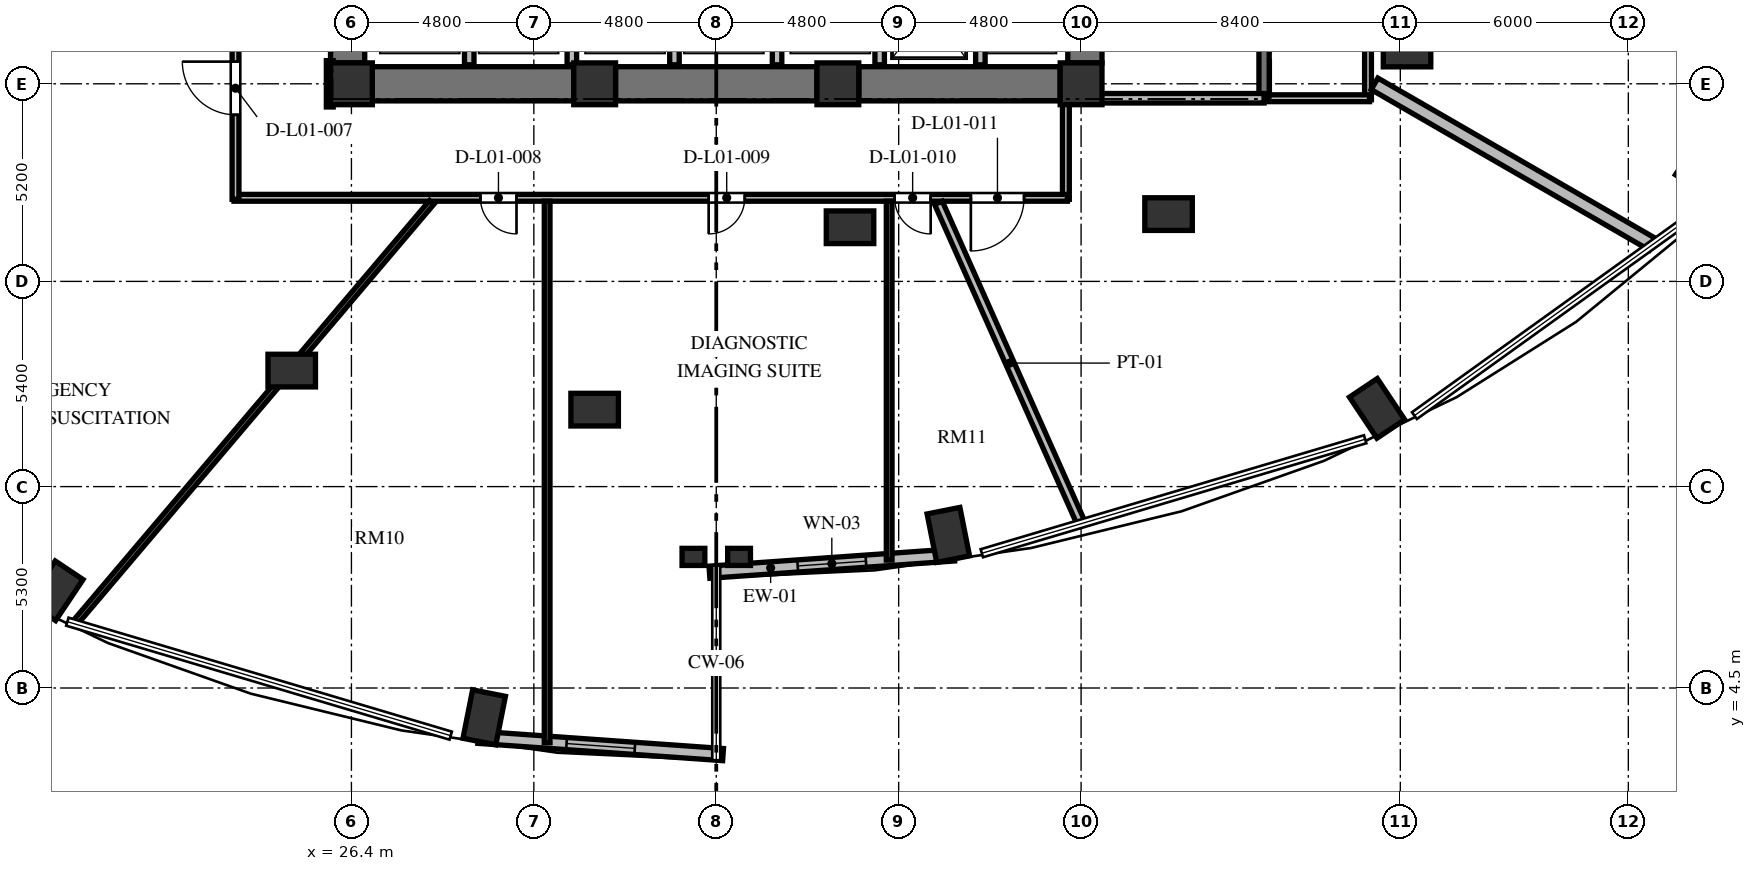
"""IFC4 building model, lengths in metres.
Left out: names, types, materials, properties, quantities, classifications, styles, units other than length and angle.
Written with IfcOpenShell. Run it as: python <this file> out.ifc"""

import sys

from ifc_helpers import new_model, si_unit, direction, frame, frame_2d, origin, origin_2d, place, context, subcontext, project, spatial, rectangle, extrude, element, fill, save


model = new_model("IFC4")
c1 = context("Model", 3, precision=1e-05, world=origin(), true_north=direction((0.0, 1.0)))
c2 = subcontext(c1, "Body", "Model", "MODEL_VIEW")
j1 = project(units=[si_unit("LENGTHUNIT", "METRE"), si_unit("PLANEANGLEUNIT", "RADIAN")], contexts=[c1])
p1 = place(None, origin())
s1 = spatial("IfcSite", under=j1, at=p1, CompositionType="ELEMENT")
p2 = place(p1, origin())
s2 = spatial("IfcBuilding", under=s1, at=p2, CompositionType="ELEMENT")
p3 = place(p2, frame((0.0, 0.0, 6.0)))
s3 = spatial("IfcBuildingStorey", under=s2, at=p3, CompositionType="ELEMENT", Elevation=6.0)
for number, where, z_axis, x_axis in (
    (1, (42.106, 8.529, 0.0), (0.0, 0.0, 1.0), (0.195, -0.981, 0.0)),
    (2, (53.389, 11.858, 0.0), (0.0, 0.0, 1.0), (0.556, -0.831, 0.0)),
    (3, (62.025, 18.011, 0.0), (0.0, 0.0, 1.0), (0.831, -0.556, 0.0)),
    (4, (18.611, 7.058, 0.0), (0.0, 0.0, 1.0), (-0.556, -0.831, 0.0)),
    (5, (29.894, 3.729, 0.0), (0.0, 0.0, 1.0), (-0.195, -0.981, 0.0)),
):
    element("IfcColumn", number, at=place(p3, frame(where, z_axis=z_axis, x_axis=x_axis)), inside=s3, PredefinedType="COLUMN", context=c2, shape_type="SweptSolid", body=[
        extrude(rectangle(XDim=1.3, YDim=0.88, at=origin_2d()), origin(), (0.0, 0.0, 1.0), 4.8),
    ])
for number, where, z_axis, x_axis in (
    (6, (26.4, 20.4, 0.0), (0.0, 0.0, 1.0), (1.0, 0.0, 0.0)),
    (7, (32.8, 20.4, 0.0), (0.0, 0.0, 1.0), (1.0, 0.0, 0.0)),
    (8, (39.2, 20.4, 0.0), (0.0, 0.0, 1.0), (1.0, 0.0, 0.0)),
    (9, (45.6, 20.4, 0.0), (0.0, 0.0, 1.0), (1.0, 0.0, 0.0)),
):
    element("IfcColumn", number, at=place(p3, frame(where, z_axis=z_axis, x_axis=x_axis)), inside=s3, PredefinedType="COLUMN", context=c2, shape_type="SweptSolid", body=[
        extrude(rectangle(XDim=1.1, YDim=1.1, at=origin_2d()), origin(), (0.0, 0.0, 1.0), 4.8),
    ])
for number, where, z_axis, x_axis in (
    (10, (39.52, 16.625, 0.0), (0.0, 0.0, 1.0), (1.0, 0.0, 0.0)),
    (11, (47.902, 16.971, 0.0), (0.0, 0.0, 1.0), (1.0, 0.0, 0.0)),
    (12, (54.177, 21.276, 0.0), (0.0, 0.0, 1.0), (1.0, 0.0, 0.0)),
    (13, (24.829, 12.853, 0.0), (0.0, 0.0, 1.0), (1.0, 0.0, 0.0)),
    (14, (32.8, 11.825, 0.0), (0.0, 0.0, 1.0), (1.0, 0.0, 0.0)),
):
    element("IfcColumn", number, at=place(p3, frame(where, z_axis=z_axis, x_axis=x_axis)), inside=s3, PredefinedType="COLUMN", context=c2, shape_type="SweptSolid", body=[
        extrude(rectangle(XDim=1.25, YDim=0.86, at=origin_2d()), origin(), (0.0, 0.0, 1.0), 4.8),
    ])
for number, where, z_axis, x_axis in (
    (15, (35.4, 7.95, 0.0), (0.0, 0.0, 1.0), (1.0, 0.0, 0.0)),
    (16, (36.6, 7.95, 0.0), (0.0, 0.0, 1.0), (1.0, 0.0, 0.0)),
):
    element("IfcColumn", number, at=place(p3, frame(where, z_axis=z_axis, x_axis=x_axis)), inside=s3, PredefinedType="PILASTER", context=c2, shape_type="SweptSolid", body=[
        extrude(rectangle(XDim=0.6, YDim=0.45, at=origin_2d()), origin(), (0.0, 0.0, 1.0), 4.8),
    ])
p4 = place(p3, frame((26.3, 20.95, 0.0), z_axis=(0.0, 0.0, 1.0), x_axis=(0.0, 1.0, 0.0)))
e17 = element("IfcWall", 17, at=p4, inside=s3, PredefinedType="SHEAR", context=c2, shape_type="SweptSolid", body=[
    extrude(rectangle(XDim=14.1, YDim=0.9, at=frame_2d((7.05, 0.0))), origin(), (0.0, 0.0, 1.0), 4.8),
])
p5 = place(p4, frame((6.5, 0.0, 0.0)))
e18 = element("IfcOpeningElement", 18, at=p5, cuts=e17, PredefinedType="OPENING", context=c2, shape_type="SweptSolid", body=[
    extrude(rectangle(XDim=1.2, YDim=2.15, at=frame_2d((0.6, 1.075))), frame((0.0, 0.46, 0.0), z_axis=(0.0, -1.0, 0.0), x_axis=(1.0, 0.0, 0.0)), (0.0, 0.0, 1.0), 0.92),
])
p6 = place(p4, frame((9.6, 0.0, 0.0)))
e19 = element("IfcOpeningElement", 19, at=p6, cuts=e17, PredefinedType="OPENING", context=c2, shape_type="SweptSolid", body=[
    extrude(rectangle(XDim=1.3, YDim=2.2, at=frame_2d((0.65, 1.1))), frame((0.0, 0.46, 0.0), z_axis=(0.0, -1.0, 0.0), x_axis=(1.0, 0.0, 0.0)), (0.0, 0.0, 1.0), 0.92),
])
p7 = place(p4, frame((3.26, 0.0, 0.0)))
e20 = element("IfcOpeningElement", 20, at=p7, cuts=e17, PredefinedType="OPENING", context=c2, shape_type="SweptSolid", body=[
    extrude(rectangle(XDim=1.3, YDim=2.2, at=frame_2d((0.65, 1.1))), frame((0.0, 0.46, 0.0), z_axis=(0.0, -1.0, 0.0), x_axis=(1.0, 0.0, 0.0)), (0.0, 0.0, 1.0), 0.92),
])
p8 = place(p3, frame((45.7, 20.95, 0.0), z_axis=(0.0, 0.0, 1.0), x_axis=(0.0, 1.0, 0.0)))
e21 = element("IfcWall", 21, at=p8, inside=s3, PredefinedType="SHEAR", context=c2, shape_type="SweptSolid", body=[
    extrude(rectangle(XDim=14.1, YDim=0.9, at=frame_2d((7.05, 0.0))), origin(), (0.0, 0.0, 1.0), 4.8),
])
p9 = place(p8, frame((11.75, 0.0, 0.0)))
e22 = element("IfcOpeningElement", 22, at=p9, cuts=e21, PredefinedType="OPENING", context=c2, shape_type="SweptSolid", body=[
    extrude(rectangle(XDim=1.4, YDim=2.3, at=frame_2d((0.7, 1.15))), frame((0.0, 0.46, 0.0), z_axis=(0.0, -1.0, 0.0), x_axis=(1.0, 0.0, 0.0)), (0.0, 0.0, 1.0), 0.92),
])
p10 = place(p8, frame((0.95, 0.0, 0.0)))
e23 = element("IfcOpeningElement", 23, at=p10, cuts=e21, PredefinedType="OPENING", context=c2, shape_type="SweptSolid", body=[
    extrude(rectangle(XDim=1.4, YDim=2.3, at=frame_2d((0.7, 1.15))), frame((0.0, 0.46, 0.0), z_axis=(0.0, -1.0, 0.0), x_axis=(1.0, 0.0, 0.0)), (0.0, 0.0, 1.0), 0.92),
])
p11 = place(p3, frame((26.95, 20.4, 0.0), z_axis=(0.0, 0.0, 1.0), x_axis=(1.0, 0.0, 0.0)))
e24 = element("IfcWall", 24, at=p11, inside=s3, PredefinedType="SHEAR", context=c2, shape_type="SweptSolid", body=[
    extrude(rectangle(XDim=5.3, YDim=0.9, at=frame_2d((2.65, 0.0))), origin(), (0.0, 0.0, 1.0), 4.8),
])
p12 = place(p3, frame((33.35, 20.4, 0.0), z_axis=(0.0, 0.0, 1.0), x_axis=(1.0, 0.0, 0.0)))
e25 = element("IfcWall", 25, at=p12, inside=s3, PredefinedType="SHEAR", context=c2, shape_type="SweptSolid", body=[
    extrude(rectangle(XDim=5.3, YDim=0.9, at=frame_2d((2.65, 0.0))), origin(), (0.0, 0.0, 1.0), 4.8),
])
p13 = place(p3, frame((39.75, 20.4, 0.0), z_axis=(0.0, 0.0, 1.0), x_axis=(1.0, 0.0, 0.0)))
e26 = element("IfcWall", 26, at=p13, inside=s3, PredefinedType="SHEAR", context=c2, shape_type="SweptSolid", body=[
    extrude(rectangle(XDim=5.3, YDim=0.9, at=frame_2d((2.65, 0.0))), origin(), (0.0, 0.0, 1.0), 4.8),
])
p14 = place(p3, frame((35.82, 7.547, 0.0), z_axis=(0.0, 0.0, 1.0), x_axis=(0.99751367159, 0.070473221795, 0.0)))
e27 = element("IfcWall", 27, at=p14, inside=s3, PredefinedType="SOLIDWALL", context=c2, shape_type="SweptSolid", body=[
    extrude(rectangle(XDim=6.458, YDim=0.32, at=frame_2d((3.229, 0.0))), origin(), (0.0, 0.0, 1.0), 4.52),
])
p15 = place(p14, frame((2.329, 0.0, 0.85)))
e28 = element("IfcOpeningElement", 28, at=p15, cuts=e27, PredefinedType="OPENING", context=c2, shape_type="SweptSolid", body=[
    extrude(rectangle(XDim=1.8, YDim=2.4, at=frame_2d((0.9, 1.2))), frame((0.0, 0.17, 0.0), z_axis=(0.0, -1.0, 0.0), x_axis=(1.0, 0.0, 0.0)), (0.0, 0.0, 1.0), 0.34),
])
p16 = place(p3, frame((29.738, 3.202, 0.0), z_axis=(0.0, 0.0, 1.0), x_axis=(0.997513108184, -0.070481196075, 0.0)))
e29 = element("IfcWall", 29, at=p16, inside=s3, PredefinedType="SOLIDWALL", context=c2, shape_type="SweptSolid", body=[
    extrude(rectangle(XDim=6.457, YDim=0.32, at=frame_2d((3.229, 0.0))), origin(), (0.0, 0.0, 1.0), 4.52),
])
p17 = place(p16, frame((2.328, 0.0, 0.85)))
e30 = element("IfcOpeningElement", 30, at=p17, cuts=e29, PredefinedType="OPENING", context=c2, shape_type="SweptSolid", body=[
    extrude(rectangle(XDim=1.8, YDim=2.4, at=frame_2d((0.9, 1.2))), frame((0.0, 0.17, 0.0), z_axis=(0.0, -1.0, 0.0), x_axis=(1.0, 0.0, 0.0)), (0.0, 0.0, 1.0), 0.34),
])
p18 = place(p3, frame((42.95, 20.9, 0.0), z_axis=(0.0, 0.0, 1.0), x_axis=(0.0, 1.0, 0.0)))
e31 = element("IfcWall", 31, at=p18, inside=s3, PredefinedType="SOLIDWALL", context=c2, shape_type="SweptSolid", body=[
    extrude(rectangle(XDim=3.2, YDim=0.25, at=frame_2d((1.6, 0.0))), origin(), (0.0, 0.0, 1.0), 4.52),
])
for number, where, z_axis, x_axis in (
    (32, (29.5, 20.9, 0.0), (0.0, 0.0, 1.0), (0.0, 1.0, 0.0)),
    (33, (32.2, 20.9, 0.0), (0.0, 0.0, 1.0), (0.0, 1.0, 0.0)),
    (34, (34.9, 20.9, 0.0), (0.0, 0.0, 1.0), (0.0, 1.0, 0.0)),
    (35, (37.6, 20.9, 0.0), (0.0, 0.0, 1.0), (0.0, 1.0, 0.0)),
    (36, (40.3, 20.9, 0.0), (0.0, 0.0, 1.0), (0.0, 1.0, 0.0)),
):
    element("IfcWall", number, at=place(p3, frame(where, z_axis=z_axis, x_axis=x_axis)), inside=s3, PredefinedType="SOLIDWALL", context=c2, shape_type="SweptSolid", body=[
        extrude(rectangle(XDim=2.8, YDim=0.25, at=frame_2d((1.4, 0.0))), origin(), (0.0, 0.0, 1.0), 4.52),
    ])
p19 = place(p3, frame((50.415, 35.845, 0.0), z_axis=(0.0, 0.0, 1.0), x_axis=(0.0, -1.0, 0.0)))
e37 = element("IfcWall", 37, at=p19, inside=s3, PredefinedType="SHEAR", context=c2, shape_type="SweptSolid", body=[
    extrude(rectangle(XDim=15.825, YDim=0.27, at=frame_2d((7.913, 0.0))), origin(), (0.0, 0.0, 1.0), 4.8),
])
p20 = place(p19, frame((4.445, 0.0, 0.0)))
e38 = element("IfcOpeningElement", 38, at=p20, cuts=e37, PredefinedType="OPENING", context=c2, shape_type="SweptSolid", body=[
    extrude(rectangle(XDim=1.2, YDim=2.15, at=frame_2d((0.6, 1.075))), frame((0.0, 0.145, 0.0), z_axis=(0.0, -1.0, 0.0), x_axis=(1.0, 0.0, 0.0)), (0.0, 0.0, 1.0), 0.29),
])
p21 = place(p19, frame((1.295, 0.0, 0.0)))
e39 = element("IfcOpeningElement", 39, at=p21, cuts=e37, PredefinedType="OPENING", context=c2, shape_type="SweptSolid", body=[
    extrude(rectangle(XDim=1.3, YDim=2.2, at=frame_2d((0.65, 1.1))), frame((0.0, 0.145, 0.0), z_axis=(0.0, -1.0, 0.0), x_axis=(1.0, 0.0, 0.0)), (0.0, 0.0, 1.0), 0.29),
])
p22 = place(p19, frame((13.095, 0.0, 0.0)))
e40 = element("IfcOpeningElement", 40, at=p22, cuts=e37, PredefinedType="OPENING", context=c2, shape_type="SweptSolid", body=[
    extrude(rectangle(XDim=1.3, YDim=2.2, at=frame_2d((0.65, 1.1))), frame((0.0, 0.145, 0.0), z_axis=(0.0, -1.0, 0.0), x_axis=(1.0, 0.0, 0.0)), (0.0, 0.0, 1.0), 0.29),
])
p23 = place(p3, frame((45.7, 20.02, 0.0), z_axis=(0.0, 0.0, 1.0), x_axis=(1.0, 0.0, 0.0)))
e41 = element("IfcWall", 41, at=p23, inside=s3, PredefinedType="SOLIDWALL", context=c2, shape_type="SweptSolid", body=[
    extrude(rectangle(XDim=4.715, YDim=0.25, at=frame_2d((2.357, 0.0))), origin(), (0.0, 0.0, 1.0), 4.52),
])
p24 = place(p3, frame((53.15, 26.64, 0.0), z_axis=(0.0, 0.0, 1.0), x_axis=(0.0, -1.0, 0.0)))
e42 = element("IfcWall", 42, at=p24, inside=s3, PredefinedType="PARTITIONING", context=c2, shape_type="SweptSolid", body=[
    extrude(rectangle(XDim=6.66, YDim=0.18, at=frame_2d((3.33, 0.0))), origin(), (0.0, 0.0, 1.0), 4.52),
])
p25 = place(p24, frame((2.671, 0.0, 0.0)))
e43 = element("IfcOpeningElement", 43, at=p25, cuts=e42, PredefinedType="OPENING", context=c2, shape_type="SweptSolid", body=[
    extrude(rectangle(XDim=1.05, YDim=2.15, at=frame_2d((0.525, 1.075))), frame((0.0, 0.1, 0.0), z_axis=(0.0, -1.0, 0.0), x_axis=(1.0, 0.0, 0.0)), (0.0, 0.0, 1.0), 0.2),
])
p26 = place(p3, frame((53.19, 20.02, 0.0), z_axis=(0.0, 0.0, 1.0), x_axis=(-1.0, 0.0, 0.0)))
e44 = element("IfcWall", 44, at=p26, inside=s3, PredefinedType="PARTITIONING", context=c2, shape_type="SweptSolid", body=[
    extrude(rectangle(XDim=2.65, YDim=0.18, at=frame_2d((1.325, 0.0))), origin(), (0.0, 0.0, 1.0), 4.52),
])
p27 = place(p3, frame((25.83, 21.01, 0.0), z_axis=(0.0, 0.0, 1.0), x_axis=(0.0, -1.0, 0.0)))
e45 = element("IfcWall", 45, at=p27, inside=s3, PredefinedType="PARTITIONING", context=c2, shape_type="SweptSolid", body=[
    extrude(rectangle(XDim=1.22, YDim=0.18, at=frame_2d((0.61, 0.0))), origin(), (0.0, 0.0, 1.0), 4.52),
])
p28 = place(p3, frame((45.2, 19.91, 0.0), z_axis=(0.0, 0.0, 1.0), x_axis=(0.0, -1.0, 0.0)))
e46 = element("IfcWall", 46, at=p28, inside=s3, PredefinedType="PARTITIONING", context=c2, shape_type="SweptSolid", body=[
    extrude(rectangle(XDim=2.55, YDim=0.18, at=frame_2d((1.275, 0.0))), origin(), (0.0, 0.0, 1.0), 4.52),
])
p29 = place(p3, frame((45.24, 17.4, 0.0), z_axis=(0.0, 0.0, 1.0), x_axis=(-1.0, 0.0, 0.0)))
e47 = element("IfcWall", 47, at=p29, inside=s3, PredefinedType="PARTITIONING", context=c2, shape_type="SweptSolid", body=[
    extrude(rectangle(XDim=21.93, YDim=0.18, at=frame_2d((10.965, 0.0))), origin(), (0.0, 0.0, 1.0), 4.52),
])
p30 = place(p29, frame((14.496, 0.0, 0.0)))
e48 = element("IfcOpeningElement", 48, at=p30, cuts=e47, PredefinedType="OPENING", context=c2, shape_type="SweptSolid", body=[
    extrude(rectangle(XDim=0.95, YDim=2.1, at=frame_2d((0.475, 1.05))), frame((0.0, 0.1, 0.0), z_axis=(0.0, -1.0, 0.0), x_axis=(1.0, 0.0, 0.0)), (0.0, 0.0, 1.0), 0.2),
])
p31 = place(p29, frame((8.49, 0.0, 0.0)))
e49 = element("IfcOpeningElement", 49, at=p31, cuts=e47, PredefinedType="OPENING", context=c2, shape_type="SweptSolid", body=[
    extrude(rectangle(XDim=0.95, YDim=2.1, at=frame_2d((0.475, 1.05))), frame((0.0, 0.1, 0.0), z_axis=(0.0, -1.0, 0.0), x_axis=(1.0, 0.0, 0.0)), (0.0, 0.0, 1.0), 0.2),
])
p32 = place(p29, frame((3.597, 0.0, 0.0)))
e50 = element("IfcOpeningElement", 50, at=p32, cuts=e47, PredefinedType="OPENING", context=c2, shape_type="SweptSolid", body=[
    extrude(rectangle(XDim=0.95, YDim=2.1, at=frame_2d((0.475, 1.05))), frame((0.0, 0.1, 0.0), z_axis=(0.0, -1.0, 0.0), x_axis=(1.0, 0.0, 0.0)), (0.0, 0.0, 1.0), 0.2),
])
p33 = place(p29, frame((1.141, 0.0, 0.0)))
e51 = element("IfcOpeningElement", 51, at=p33, cuts=e47, PredefinedType="OPENING", context=c2, shape_type="SweptSolid", body=[
    extrude(rectangle(XDim=1.4, YDim=2.2, at=frame_2d((0.7, 1.1))), frame((0.0, 0.1, 0.0), z_axis=(0.0, -1.0, 0.0), x_axis=(1.0, 0.0, 0.0)), (0.0, 0.0, 1.0), 0.2),
])
p34 = place(p3, frame((23.35, 17.36, 0.0), z_axis=(0.0, 0.0, 1.0), x_axis=(0.0, 1.0, 0.0)))
e52 = element("IfcWall", 52, at=p34, inside=s3, PredefinedType="PARTITIONING", context=c2, shape_type="SweptSolid", body=[
    extrude(rectangle(XDim=9.28, YDim=0.18, at=frame_2d((4.64, 0.0))), origin(), (0.0, 0.0, 1.0), 4.52),
])
p35 = place(p34, frame((2.224, 0.0, 0.0)))
e53 = element("IfcOpeningElement", 53, at=p35, cuts=e52, PredefinedType="OPENING", context=c2, shape_type="SweptSolid", body=[
    extrude(rectangle(XDim=1.4, YDim=2.2, at=frame_2d((0.7, 1.1))), frame((0.0, 0.1, 0.0), z_axis=(0.0, -1.0, 0.0), x_axis=(1.0, 0.0, 0.0)), (0.0, 0.0, 1.0), 0.2),
])
p36 = place(p3, frame((41.847, 17.267, 0.0), z_axis=(0.0, 0.0, 1.0), x_axis=(0.406746917765, -0.913540882987, 0.0)))
e54 = element("IfcWall", 54, at=p36, inside=s3, PredefinedType="PARTITIONING", context=c2, shape_type="SweptSolid", body=[
    extrude(rectangle(XDim=9.231, YDim=0.22, at=frame_2d((4.616, 0.0))), origin(), (0.0, 0.0, 1.0), 4.52),
])
p37 = place(p3, frame((53.322, 20.399, 0.0), z_axis=(0.0, 0.0, 1.0), x_axis=(0.866024398109, -0.500001741877, 0.0)))
e55 = element("IfcWall", 55, at=p37, inside=s3, PredefinedType="SOLIDWALL", context=c2, shape_type="SweptSolid", body=[
    extrude(rectangle(XDim=8.45, YDim=0.35, at=frame_2d((4.225, 0.0))), origin(), (0.0, 0.0, 1.0), 4.52),
])
p38 = place(p3, frame((23.261, 22.892, 0.0), z_axis=(0.0, 0.0, 1.0), x_axis=(-0.978149523722, -0.207902643662, 0.0)))
e56 = element("IfcWall", 56, at=p38, inside=s3, PredefinedType="PARTITIONING", context=c2, shape_type="SweptSolid", body=[
    extrude(rectangle(XDim=17.963, YDim=0.15, at=frame_2d((8.982, 0.0))), origin(), (0.0, 0.0, 1.0), 4.52),
])
p39 = place(p3, frame((28.513, 17.279, 0.0), z_axis=(0.0, 0.0, 1.0), x_axis=(-0.646855904645, -0.762612246575, 0.0)))
e57 = element("IfcWall", 57, at=p39, inside=s3, PredefinedType="PARTITIONING", context=c2, shape_type="SweptSolid", body=[
    extrude(rectangle(XDim=14.546, YDim=0.15, at=frame_2d((7.273, 0.0))), origin(), (0.0, 0.0, 1.0), 3.805),
])
p40 = place(p3, frame((31.55, 3.06, 0.0), z_axis=(0.0, 0.0, 1.0), x_axis=(0.0, 1.0, 0.0)))
e58 = element("IfcWall", 58, at=p40, inside=s3, PredefinedType="PARTITIONING", context=c2, shape_type="SweptSolid", body=[
    extrude(rectangle(XDim=14.25, YDim=0.15, at=frame_2d((7.125, 0.0))), origin(), (0.0, 0.0, 1.0), 4.52),
])
p41 = place(p3, frame((40.55, 7.866, 0.0), z_axis=(0.0, 0.0, 1.0), x_axis=(0.0, 1.0, 0.0)))
e59 = element("IfcWall", 59, at=p41, inside=s3, PredefinedType="PARTITIONING", context=c2, shape_type="SweptSolid", body=[
    extrude(rectangle(XDim=9.444, YDim=0.15, at=frame_2d((4.722, 0.0))), origin(), (0.0, 0.0, 1.0), 4.52),
])
p42 = place(p15, origin())
e60 = element("IfcWindow", 60, at=p42, inside=s3, PartitioningType="SINGLE_PANEL", PredefinedType="WINDOW", context=c2, shape_type="SweptSolid", body=[
    extrude(rectangle(XDim=1.8, YDim=2.4, at=frame_2d((0.9, 1.2))), frame((0.0, 0.03, 0.0), z_axis=(0.0, -1.0, 0.0), x_axis=(1.0, 0.0, 0.0)), (0.0, 0.0, 1.0), 0.06),
])
fill(e28, e60)
p43 = place(p17, origin())
e61 = element("IfcWindow", 61, at=p43, inside=s3, PartitioningType="SINGLE_PANEL", PredefinedType="WINDOW", context=c2, shape_type="SweptSolid", body=[
    extrude(rectangle(XDim=1.8, YDim=2.4, at=frame_2d((0.9, 1.2))), frame((0.0, 0.03, 0.0), z_axis=(0.0, -1.0, 0.0), x_axis=(1.0, 0.0, 0.0)), (0.0, 0.0, 1.0), 0.06),
])
fill(e30, e61)
p44 = place(p35, origin())
e62 = element("IfcDoor", 62, at=p44, inside=s3, OperationType="SINGLE_SWING_RIGHT", PredefinedType="DOOR", context=c2, shape_type="SweptSolid", body=[
    extrude(rectangle(XDim=1.4, YDim=2.2, at=frame_2d((0.7, 1.1))), frame((0.0, 0.025, 0.0), z_axis=(0.0, -1.0, 0.0), x_axis=(1.0, 0.0, 0.0)), (0.0, 0.0, 1.0), 0.05),
])
fill(e53, e62)
p45 = place(p30, origin())
e63 = element("IfcDoor", 63, at=p45, inside=s3, OperationType="SINGLE_SWING_LEFT", PredefinedType="DOOR", context=c2, shape_type="SweptSolid", body=[
    extrude(rectangle(XDim=0.95, YDim=2.1, at=frame_2d((0.475, 1.05))), frame((0.0, 0.025, 0.0), z_axis=(0.0, -1.0, 0.0), x_axis=(1.0, 0.0, 0.0)), (0.0, 0.0, 1.0), 0.05),
])
fill(e48, e63)
p46 = place(p31, origin())
e64 = element("IfcDoor", 64, at=p46, inside=s3, OperationType="SINGLE_SWING_RIGHT", PredefinedType="DOOR", context=c2, shape_type="SweptSolid", body=[
    extrude(rectangle(XDim=0.95, YDim=2.1, at=frame_2d((0.475, 1.05))), frame((0.0, 0.025, 0.0), z_axis=(0.0, -1.0, 0.0), x_axis=(1.0, 0.0, 0.0)), (0.0, 0.0, 1.0), 0.05),
])
fill(e49, e64)
p47 = place(p32, origin())
e65 = element("IfcDoor", 65, at=p47, inside=s3, OperationType="SINGLE_SWING_LEFT", PredefinedType="DOOR", context=c2, shape_type="SweptSolid", body=[
    extrude(rectangle(XDim=0.95, YDim=2.1, at=frame_2d((0.475, 1.05))), frame((0.0, 0.025, 0.0), z_axis=(0.0, -1.0, 0.0), x_axis=(1.0, 0.0, 0.0)), (0.0, 0.0, 1.0), 0.05),
])
fill(e50, e65)
p48 = place(p33, origin())
e66 = element("IfcDoor", 66, at=p48, inside=s3, OperationType="SINGLE_SWING_RIGHT", PredefinedType="DOOR", context=c2, shape_type="SweptSolid", body=[
    extrude(rectangle(XDim=1.4, YDim=2.2, at=frame_2d((0.7, 1.1))), frame((0.0, 0.025, 0.0), z_axis=(0.0, -1.0, 0.0), x_axis=(1.0, 0.0, 0.0)), (0.0, 0.0, 1.0), 0.05),
])
fill(e51, e66)
save(model, sys.argv[1])
